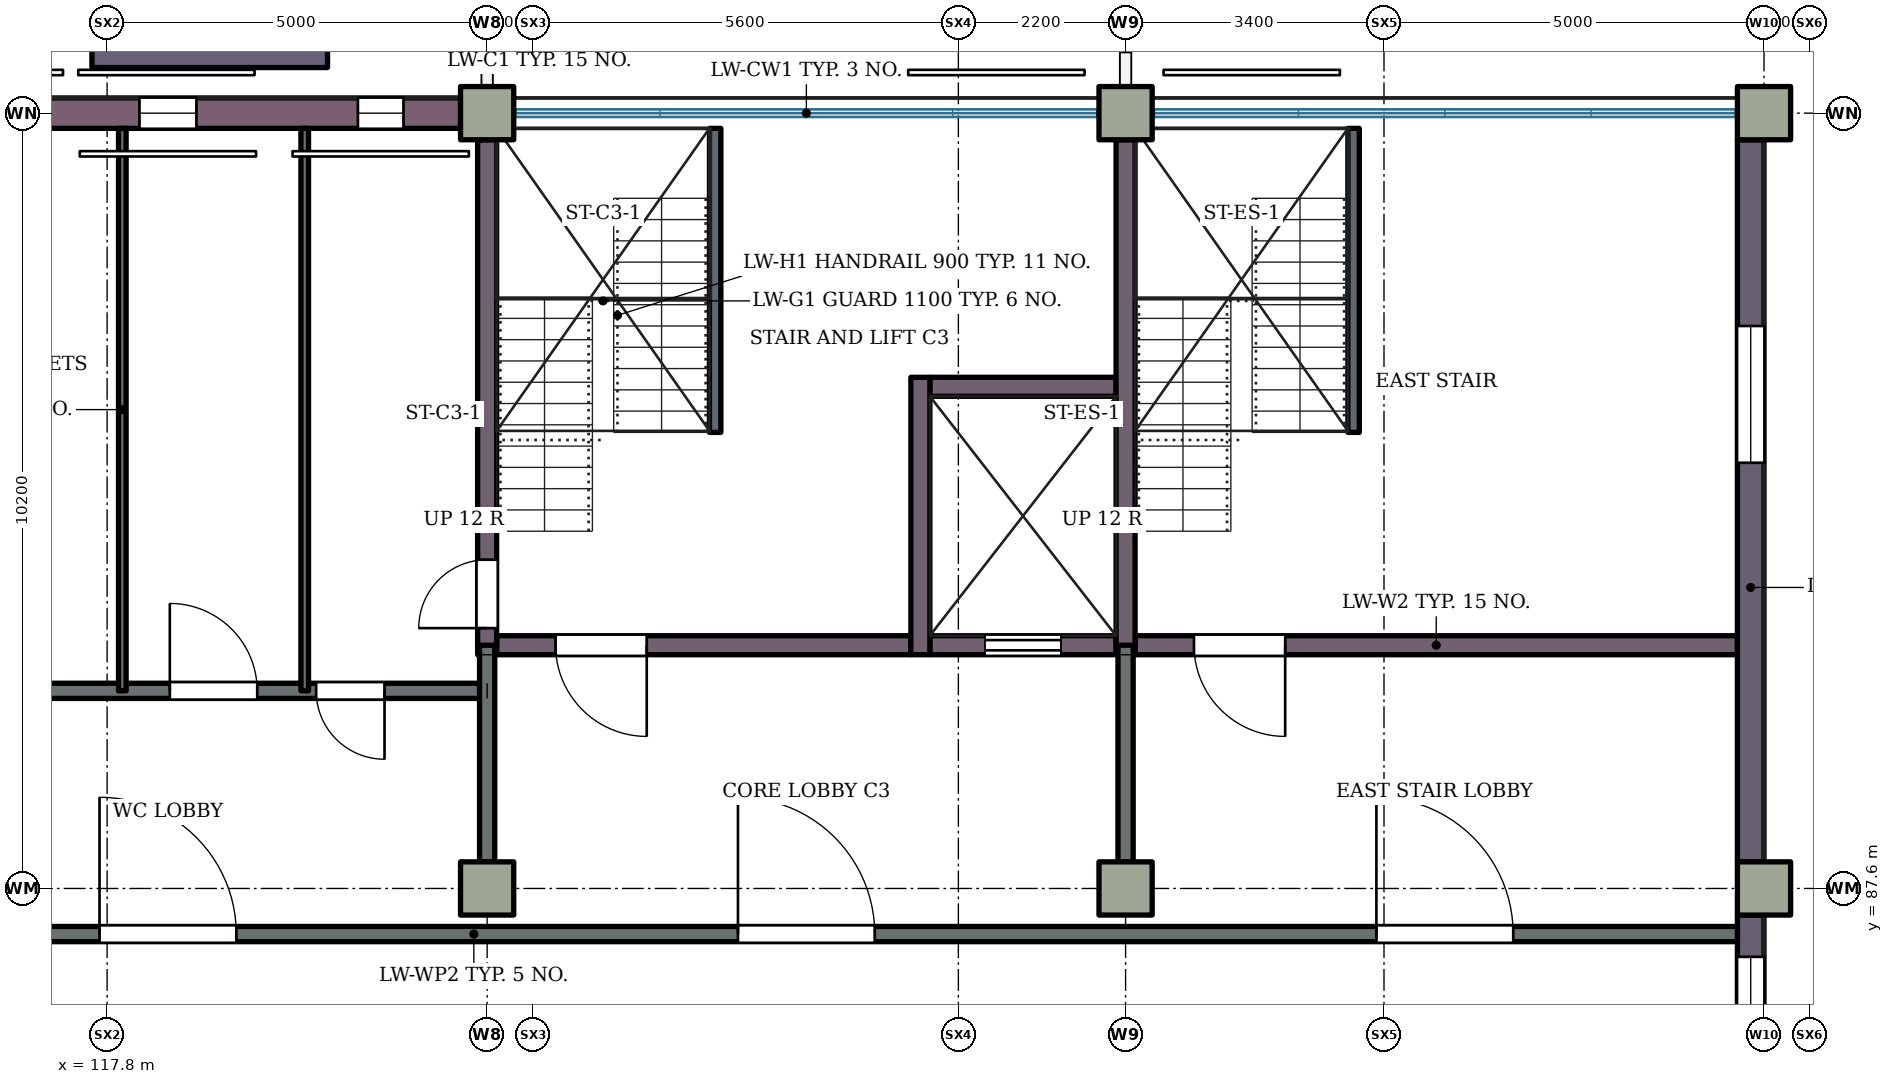
"""IFC4 building model, lengths in metres.
Left out: names, types, materials, properties, quantities, classifications, styles, units other than length and angle.
Written with IfcOpenShell. Run it as: python <this file> out.ifc"""

import sys

from ifc_helpers import new_model, si_unit, direction, frame, frame_2d, origin, origin_2d, place, context, subcontext, project, spatial, rectangle, extrude, element, fill, save


model = new_model("IFC4")
c1 = context("Model", 3, precision=1e-05, world=origin(), true_north=direction((0.0, 1.0)))
c2 = subcontext(c1, "Body", "Model", "MODEL_VIEW")
j1 = project(units=[si_unit("LENGTHUNIT", "METRE"), si_unit("PLANEANGLEUNIT", "RADIAN")], contexts=[c1])
p1 = place(None, origin())
s1 = spatial("IfcSite", under=j1, at=p1, CompositionType="ELEMENT")
p2 = place(p1, origin())
s2 = spatial("IfcBuilding", under=s1, at=p2, CompositionType="ELEMENT")
p3 = place(p2, frame((0.0, 0.0, 4.2)))
s3 = spatial("IfcBuildingStorey", under=s2, at=p3, CompositionType="ELEMENT", Elevation=4.2)
for number, where, z_axis, x_axis in (
    (1, (122.8, 87.6, 0.0), (0.0, 0.0, 1.0), (1.0, 0.0, 0.0)),
    (2, (131.2, 87.6, 0.0), (0.0, 0.0, 1.0), (1.0, 0.0, 0.0)),
    (3, (139.6, 87.6, 0.0), (0.0, 0.0, 1.0), (1.0, 0.0, 0.0)),
    (4, (122.8, 97.8, 0.0), (0.0, 0.0, 1.0), (1.0, 0.0, 0.0)),
    (5, (131.2, 97.8, 0.0), (0.0, 0.0, 1.0), (1.0, 0.0, 0.0)),
    (6, (139.6, 97.8, 0.0), (0.0, 0.0, 1.0), (1.0, 0.0, 0.0)),
):
    element("IfcColumn", number, at=place(p3, frame(where, z_axis=z_axis, x_axis=x_axis)), inside=s3, PredefinedType="COLUMN", context=c2, shape_type="SweptSolid", body=[
        extrude(rectangle(XDim=0.7, YDim=0.7, at=origin_2d()), origin(), (0.0, 0.0, 1.0), 4.2),
    ])
p4 = place(p3, frame((122.925, 90.8, 0.0), z_axis=(0.0, 0.0, 1.0), x_axis=(1.0, 0.0, 0.0)))
e7 = element("IfcWall", 7, at=p4, inside=s3, PredefinedType="SHEAR", context=c2, shape_type="SweptSolid", body=[
    extrude(rectangle(XDim=5.45, YDim=0.25, at=frame_2d((2.725, 0.0))), origin(), (0.0, 0.0, 1.0), 4.2),
])
p5 = place(p4, frame((0.775, 0.0, 0.0)))
e8 = element("IfcOpeningElement", 8, at=p5, cuts=e7, PredefinedType="OPENING", context=c2, shape_type="SweptSolid", body=[
    extrude(rectangle(XDim=1.2, YDim=2.1, at=frame_2d((0.6, 1.05))), frame((0.0, 0.135, 0.0), z_axis=(0.0, -1.0, 0.0), x_axis=(1.0, 0.0, 0.0)), (0.0, 0.0, 1.0), 0.27),
])
p6 = place(p3, frame((128.625, 90.8, 0.0), z_axis=(0.0, 0.0, 1.0), x_axis=(1.0, 0.0, 0.0)))
e9 = element("IfcWall", 9, at=p6, inside=s3, PredefinedType="SHEAR", context=c2, shape_type="SweptSolid", body=[
    extrude(rectangle(XDim=2.45, YDim=0.25, at=frame_2d((1.225, 0.0))), origin(), (0.0, 0.0, 1.0), 4.2),
])
p7 = place(p6, frame((0.725, 0.0, 0.0)))
e10 = element("IfcOpeningElement", 10, at=p7, cuts=e9, PredefinedType="OPENING", context=c2, shape_type="SweptSolid", body=[
    extrude(rectangle(XDim=1.0, YDim=2.1, at=frame_2d((0.5, 1.05))), frame((0.0, 0.135, 0.0), z_axis=(0.0, -1.0, 0.0), x_axis=(1.0, 0.0, 0.0)), (0.0, 0.0, 1.0), 0.27),
])
p8 = place(p3, frame((131.325, 90.8, 0.0), z_axis=(0.0, 0.0, 1.0), x_axis=(1.0, 0.0, 0.0)))
e11 = element("IfcWall", 11, at=p8, inside=s3, PredefinedType="SHEAR", context=c2, shape_type="SweptSolid", body=[
    extrude(rectangle(XDim=7.925, YDim=0.25, at=frame_2d((3.962, 0.0))), origin(), (0.0, 0.0, 1.0), 4.2),
])
p9 = place(p8, frame((0.775, 0.0, 0.0)))
e12 = element("IfcOpeningElement", 12, at=p9, cuts=e11, PredefinedType="OPENING", context=c2, shape_type="SweptSolid", body=[
    extrude(rectangle(XDim=1.2, YDim=2.1, at=frame_2d((0.6, 1.05))), frame((0.0, 0.135, 0.0), z_axis=(0.0, -1.0, 0.0), x_axis=(1.0, 0.0, 0.0)), (0.0, 0.0, 1.0), 0.27),
])
p10 = place(p3, frame((128.625, 94.2, 0.0), z_axis=(0.0, 0.0, 1.0), x_axis=(1.0, 0.0, 0.0)))
e13 = element("IfcWall", 13, at=p10, inside=s3, PredefinedType="SHEAR", context=c2, shape_type="SweptSolid", body=[
    extrude(rectangle(XDim=2.45, YDim=0.25, at=frame_2d((1.225, 0.0))), origin(), (0.0, 0.0, 1.0), 4.2),
])
p11 = place(p3, frame((122.8, 90.675, 0.0), z_axis=(0.0, 0.0, 1.0), x_axis=(0.0, 1.0, 0.0)))
e14 = element("IfcWall", 14, at=p11, inside=s3, PredefinedType="SHEAR", context=c2, shape_type="SweptSolid", body=[
    extrude(rectangle(XDim=6.775, YDim=0.25, at=frame_2d((3.387, 0.0))), origin(), (0.0, 0.0, 1.0), 4.2),
])
p12 = place(p11, frame((0.35, 0.0, 0.0)))
e15 = element("IfcOpeningElement", 15, at=p12, cuts=e14, PredefinedType="OPENING", context=c2, shape_type="SweptSolid", body=[
    extrude(rectangle(XDim=0.9, YDim=2.1, at=frame_2d((0.45, 1.05))), frame((0.0, 0.135, 0.0), z_axis=(0.0, -1.0, 0.0), x_axis=(1.0, 0.0, 0.0)), (0.0, 0.0, 1.0), 0.27),
])
p13 = place(p3, frame((128.5, 90.675, 0.0), z_axis=(0.0, 0.0, 1.0), x_axis=(0.0, 1.0, 0.0)))
e16 = element("IfcWall", 16, at=p13, inside=s3, PredefinedType="SHEAR", context=c2, shape_type="SweptSolid", body=[
    extrude(rectangle(XDim=3.65, YDim=0.25, at=frame_2d((1.825, 0.0))), origin(), (0.0, 0.0, 1.0), 4.2),
])
p14 = place(p3, frame((131.2, 90.675, 0.0), z_axis=(0.0, 0.0, 1.0), x_axis=(0.0, 1.0, 0.0)))
e17 = element("IfcWall", 17, at=p14, inside=s3, PredefinedType="SHEAR", context=c2, shape_type="SweptSolid", body=[
    extrude(rectangle(XDim=6.775, YDim=0.25, at=frame_2d((3.387, 0.0))), origin(), (0.0, 0.0, 1.0), 4.2),
])
p15 = place(p3, frame((139.425, 87.25, 0.0), z_axis=(0.0, 0.0, 1.0), x_axis=(0.0, -1.0, 0.0)))
e18 = element("IfcWall", 18, at=p15, inside=s3, PredefinedType="SHEAR", context=c2, shape_type="SweptSolid", body=[
    extrude(rectangle(XDim=8.5, YDim=0.35, at=frame_2d((4.25, 0.0))), origin(), (0.0, 0.0, 1.0), 4.2),
])
p16 = place(p15, frame((6.15, 0.0, 0.9)))
e19 = element("IfcOpeningElement", 19, at=p16, cuts=e18, PredefinedType="OPENING", context=c2, shape_type="SweptSolid", body=[
    extrude(rectangle(XDim=1.8, YDim=2.1, at=frame_2d((0.9, 1.05))), frame((0.0, 0.185, 0.0), z_axis=(0.0, -1.0, 0.0), x_axis=(1.0, 0.0, 0.0)), (0.0, 0.0, 1.0), 0.37),
])
p17 = place(p15, frame((0.55, 0.0, 0.9)))
e20 = element("IfcOpeningElement", 20, at=p17, cuts=e18, PredefinedType="OPENING", context=c2, shape_type="SweptSolid", body=[
    extrude(rectangle(XDim=1.8, YDim=2.1, at=frame_2d((0.9, 1.05))), frame((0.0, 0.185, 0.0), z_axis=(0.0, -1.0, 0.0), x_axis=(1.0, 0.0, 0.0)), (0.0, 0.0, 1.0), 0.37),
])
p18 = place(p3, frame((139.425, 97.45, 0.0), z_axis=(0.0, 0.0, 1.0), x_axis=(0.0, -1.0, 0.0)))
e21 = element("IfcWall", 21, at=p18, inside=s3, PredefinedType="SHEAR", context=c2, shape_type="SweptSolid", body=[
    extrude(rectangle(XDim=9.5, YDim=0.35, at=frame_2d((4.75, 0.0))), origin(), (0.0, 0.0, 1.0), 4.2),
])
p19 = place(p18, frame((2.45, 0.0, 0.9)))
e22 = element("IfcOpeningElement", 22, at=p19, cuts=e21, PredefinedType="OPENING", context=c2, shape_type="SweptSolid", body=[
    extrude(rectangle(XDim=1.8, YDim=2.1, at=frame_2d((0.9, 1.05))), frame((0.0, 0.185, 0.0), z_axis=(0.0, -1.0, 0.0), x_axis=(1.0, 0.0, 0.0)), (0.0, 0.0, 1.0), 0.37),
])
p20 = place(p3, frame((114.75, 97.8, 0.0), z_axis=(0.0, 0.0, 1.0), x_axis=(1.0, 0.0, 0.0)))
e23 = element("IfcWall", 23, at=p20, inside=s3, PredefinedType="SOLIDWALL", context=c2, shape_type="SweptSolid", body=[
    extrude(rectangle(XDim=7.7, YDim=0.4, at=frame_2d((3.85, 0.0))), origin(), (0.0, 0.0, 1.0), 3.32),
])
p21 = place(p20, frame((0.75, 0.0, 2.1)))
e24 = element("IfcOpeningElement", 24, at=p21, cuts=e23, PredefinedType="OPENING", context=c2, shape_type="SweptSolid", body=[
    extrude(rectangle(XDim=0.6, YDim=0.9, at=frame_2d((0.3, 0.45))), frame((0.0, 0.21, 0.0), z_axis=(0.0, -1.0, 0.0), x_axis=(1.0, 0.0, 0.0)), (0.0, 0.0, 1.0), 0.42),
])
p22 = place(p20, frame((3.475, 0.0, 2.1)))
e25 = element("IfcOpeningElement", 25, at=p22, cuts=e23, PredefinedType="OPENING", context=c2, shape_type="SweptSolid", body=[
    extrude(rectangle(XDim=0.75, YDim=0.9, at=frame_2d((0.375, 0.45))), frame((0.0, 0.21, 0.0), z_axis=(0.0, -1.0, 0.0), x_axis=(1.0, 0.0, 0.0)), (0.0, 0.0, 1.0), 0.42),
])
p23 = place(p20, frame((6.35, 0.0, 2.1)))
e26 = element("IfcOpeningElement", 26, at=p23, cuts=e23, PredefinedType="OPENING", context=c2, shape_type="SweptSolid", body=[
    extrude(rectangle(XDim=0.6, YDim=0.9, at=frame_2d((0.3, 0.45))), frame((0.0, 0.21, 0.0), z_axis=(0.0, -1.0, 0.0), x_axis=(1.0, 0.0, 0.0)), (0.0, 0.0, 1.0), 0.42),
])
p24 = place(p3, frame((120.7, 98.9, 0.0), z_axis=(0.0, 0.0, 1.0), x_axis=(-1.0, 0.0, 0.0)))
e27 = element("IfcWall", 27, at=p24, inside=s3, PredefinedType="STANDARD", context=c2, shape_type="SweptSolid", body=[
    extrude(rectangle(XDim=3.1, YDim=1.0, at=frame_2d((1.55, 0.0))), origin(), (0.0, 0.0, 1.0), 4.2),
])
p25 = place(p3, frame((106.0, 87.0, 0.0), z_axis=(0.0, 0.0, 1.0), x_axis=(1.0, 0.0, 0.0)))
e28 = element("IfcWall", 28, at=p25, inside=s3, PredefinedType="PARTITIONING", context=c2, shape_type="SweptSolid", body=[
    extrude(rectangle(XDim=33.25, YDim=0.2, at=frame_2d((16.625, 0.0))), origin(), (0.0, 0.0, 1.0), 3.92),
])
p26 = place(p25, frame((3.3, 0.0, 0.0)))
e29 = element("IfcOpeningElement", 29, at=p26, cuts=e28, PredefinedType="OPENING", context=c2, shape_type="SweptSolid", body=[
    extrude(rectangle(XDim=1.8, YDim=2.1, at=frame_2d((0.9, 1.05))), frame((0.0, 0.11, 0.0), z_axis=(0.0, -1.0, 0.0), x_axis=(1.0, 0.0, 0.0)), (0.0, 0.0, 1.0), 0.22),
])
p27 = place(p25, frame((11.7, 0.0, 0.0)))
e30 = element("IfcOpeningElement", 30, at=p27, cuts=e28, PredefinedType="OPENING", context=c2, shape_type="SweptSolid", body=[
    extrude(rectangle(XDim=1.8, YDim=2.1, at=frame_2d((0.9, 1.05))), frame((0.0, 0.11, 0.0), z_axis=(0.0, -1.0, 0.0), x_axis=(1.0, 0.0, 0.0)), (0.0, 0.0, 1.0), 0.22),
])
p28 = place(p25, frame((20.1, 0.0, 0.0)))
e31 = element("IfcOpeningElement", 31, at=p28, cuts=e28, PredefinedType="OPENING", context=c2, shape_type="SweptSolid", body=[
    extrude(rectangle(XDim=1.8, YDim=2.1, at=frame_2d((0.9, 1.05))), frame((0.0, 0.11, 0.0), z_axis=(0.0, -1.0, 0.0), x_axis=(1.0, 0.0, 0.0)), (0.0, 0.0, 1.0), 0.22),
])
p29 = place(p25, frame((28.5, 0.0, 0.0)))
e32 = element("IfcOpeningElement", 32, at=p29, cuts=e28, PredefinedType="OPENING", context=c2, shape_type="SweptSolid", body=[
    extrude(rectangle(XDim=1.8, YDim=2.1, at=frame_2d((0.9, 1.05))), frame((0.0, 0.11, 0.0), z_axis=(0.0, -1.0, 0.0), x_axis=(1.0, 0.0, 0.0)), (0.0, 0.0, 1.0), 0.22),
])
p30 = place(p3, frame((114.4, 90.2, 0.0), z_axis=(0.0, 0.0, 1.0), x_axis=(1.0, 0.0, 0.0)))
e33 = element("IfcWall", 33, at=p30, inside=s3, PredefinedType="PARTITIONING", context=c2, shape_type="SweptSolid", body=[
    extrude(rectangle(XDim=8.4, YDim=0.2, at=frame_2d((4.2, 0.0))), origin(), (0.0, 0.0, 1.0), 3.92),
])
p31 = place(p30, frame((1.35, 0.0, 0.0)))
e34 = element("IfcOpeningElement", 34, at=p31, cuts=e33, PredefinedType="OPENING", context=c2, shape_type="SweptSolid", body=[
    extrude(rectangle(XDim=0.9, YDim=2.1, at=frame_2d((0.45, 1.05))), frame((0.0, 0.11, 0.0), z_axis=(0.0, -1.0, 0.0), x_axis=(1.0, 0.0, 0.0)), (0.0, 0.0, 1.0), 0.22),
])
p32 = place(p30, frame((4.225, 0.0, 0.0)))
e35 = element("IfcOpeningElement", 35, at=p32, cuts=e33, PredefinedType="OPENING", context=c2, shape_type="SweptSolid", body=[
    extrude(rectangle(XDim=1.15, YDim=2.1, at=frame_2d((0.575, 1.05))), frame((0.0, 0.11, 0.0), z_axis=(0.0, -1.0, 0.0), x_axis=(1.0, 0.0, 0.0)), (0.0, 0.0, 1.0), 0.22),
])
p33 = place(p30, frame((6.15, 0.0, 0.0)))
e36 = element("IfcOpeningElement", 36, at=p33, cuts=e33, PredefinedType="OPENING", context=c2, shape_type="SweptSolid", body=[
    extrude(rectangle(XDim=0.9, YDim=2.1, at=frame_2d((0.45, 1.05))), frame((0.0, 0.11, 0.0), z_axis=(0.0, -1.0, 0.0), x_axis=(1.0, 0.0, 0.0)), (0.0, 0.0, 1.0), 0.22),
])
for number, where, z_axis, x_axis in (
    (37, (118.0, 90.2, 0.0), (0.0, 0.0, 1.0), (0.0, 1.0, 0.0)),
    (38, (120.4, 90.2, 0.0), (0.0, 0.0, 1.0), (0.0, 1.0, 0.0)),
):
    element("IfcWall", number, at=place(p3, frame(where, z_axis=z_axis, x_axis=x_axis)), inside=s3, PredefinedType="PARTITIONING", context=c2, shape_type="SweptSolid", body=[
        extrude(rectangle(XDim=7.4, YDim=0.1, at=frame_2d((3.7, 0.0))), origin(), (0.0, 0.0, 1.0), 3.92),
    ])
for number, where, z_axis, x_axis in (
    (39, (122.8, 87.95, 0.0), (0.0, 0.0, 1.0), (0.0, 1.0, 0.0)),
    (40, (131.2, 87.95, 0.0), (0.0, 0.0, 1.0), (0.0, 1.0, 0.0)),
):
    element("IfcWall", number, at=place(p3, frame(where, z_axis=z_axis, x_axis=x_axis)), inside=s3, PredefinedType="PARTITIONING", context=c2, shape_type="SweptSolid", body=[
        extrude(rectangle(XDim=2.85, YDim=0.2, at=frame_2d((1.425, 0.0))), origin(), (0.0, 0.0, 1.0), 3.02),
    ])
for number, where, z_axis, x_axis in (
    (41, (125.8, 93.6, 0.0), (0.0, 0.0, 1.0), (0.0, 1.0, 0.0)),
    (42, (134.2, 93.6, 0.0), (0.0, 0.0, 1.0), (0.0, 1.0, 0.0)),
):
    element("IfcWall", number, at=place(p3, frame(where, z_axis=z_axis, x_axis=x_axis)), inside=s3, PredefinedType="PARTITIONING", context=c2, shape_type="SweptSolid", body=[
        extrude(rectangle(XDim=4.0, YDim=0.15, at=frame_2d((2.0, 0.0))), origin(), (0.0, 0.0, 1.0), 3.92),
    ])
p34 = place(p22, origin())
e43 = element("IfcWindow", 43, at=p34, inside=s3, PartitioningType="SINGLE_PANEL", PredefinedType="WINDOW", context=c2, shape_type="SweptSolid", body=[
    extrude(rectangle(XDim=0.75, YDim=0.9, at=frame_2d((0.375, 0.45))), frame((0.0, 0.03, 0.0), z_axis=(0.0, -1.0, 0.0), x_axis=(1.0, 0.0, 0.0)), (0.0, 0.0, 1.0), 0.06),
])
fill(e25, e43)
p35 = place(p23, origin())
e44 = element("IfcWindow", 44, at=p35, inside=s3, PartitioningType="SINGLE_PANEL", PredefinedType="WINDOW", context=c2, shape_type="SweptSolid", body=[
    extrude(rectangle(XDim=0.6, YDim=0.9, at=frame_2d((0.3, 0.45))), frame((0.0, 0.03, 0.0), z_axis=(0.0, -1.0, 0.0), x_axis=(1.0, 0.0, 0.0)), (0.0, 0.0, 1.0), 0.06),
])
fill(e26, e44)
p36 = place(p17, origin())
e45 = element("IfcWindow", 45, at=p36, inside=s3, PartitioningType="SINGLE_PANEL", PredefinedType="WINDOW", context=c2, shape_type="SweptSolid", body=[
    extrude(rectangle(XDim=1.8, YDim=2.1, at=frame_2d((0.9, 1.05))), frame((0.0, 0.03, 0.0), z_axis=(0.0, -1.0, 0.0), x_axis=(1.0, 0.0, 0.0)), (0.0, 0.0, 1.0), 0.06),
])
fill(e20, e45)
p37 = place(p19, origin())
e46 = element("IfcWindow", 46, at=p37, inside=s3, PartitioningType="SINGLE_PANEL", PredefinedType="WINDOW", context=c2, shape_type="SweptSolid", body=[
    extrude(rectangle(XDim=1.8, YDim=2.1, at=frame_2d((0.9, 1.05))), frame((0.0, 0.03, 0.0), z_axis=(0.0, -1.0, 0.0), x_axis=(1.0, 0.0, 0.0)), (0.0, 0.0, 1.0), 0.06),
])
fill(e22, e46)
p38 = place(p32, origin())
e47 = element("IfcDoor", 47, at=p38, inside=s3, OperationType="SINGLE_SWING_LEFT", PredefinedType="DOOR", context=c2, shape_type="SweptSolid", body=[
    extrude(rectangle(XDim=1.15, YDim=2.1, at=frame_2d((0.575, 1.05))), frame((0.0, 0.025, 0.0), z_axis=(0.0, -1.0, 0.0), x_axis=(1.0, 0.0, 0.0)), (0.0, 0.0, 1.0), 0.05),
])
fill(e35, e47)
p39 = place(p33, origin())
e48 = element("IfcDoor", 48, at=p39, inside=s3, OperationType="SINGLE_SWING_RIGHT", PredefinedType="DOOR", context=c2, shape_type="SweptSolid", body=[
    extrude(rectangle(XDim=0.9, YDim=2.1, at=frame_2d((0.45, 1.05))), frame((0.0, 0.025, 0.0), z_axis=(0.0, -1.0, 0.0), x_axis=(1.0, 0.0, 0.0)), (0.0, 0.0, 1.0), 0.05),
])
fill(e36, e48)
p40 = place(p12, origin())
e49 = element("IfcDoor", 49, at=p40, inside=s3, OperationType="SINGLE_SWING_LEFT", PredefinedType="DOOR", context=c2, shape_type="SweptSolid", body=[
    extrude(rectangle(XDim=0.9, YDim=2.1, at=frame_2d((0.45, 1.05))), frame((0.0, 0.025, 0.0), z_axis=(0.0, -1.0, 0.0), x_axis=(1.0, 0.0, 0.0)), (0.0, 0.0, 1.0), 0.05),
])
fill(e15, e49)
p41 = place(p27, origin())
e50 = element("IfcDoor", 50, at=p41, inside=s3, OperationType="DOUBLE_DOOR_SINGLE_SWING", PredefinedType="DOOR", context=c2, shape_type="SweptSolid", body=[
    extrude(rectangle(XDim=1.8, YDim=2.1, at=frame_2d((0.9, 1.05))), frame((0.0, 0.025, 0.0), z_axis=(0.0, -1.0, 0.0), x_axis=(1.0, 0.0, 0.0)), (0.0, 0.0, 1.0), 0.05),
])
fill(e30, e50)
p42 = place(p28, origin())
e51 = element("IfcDoor", 51, at=p42, inside=s3, OperationType="DOUBLE_DOOR_SINGLE_SWING", PredefinedType="DOOR", context=c2, shape_type="SweptSolid", body=[
    extrude(rectangle(XDim=1.8, YDim=2.1, at=frame_2d((0.9, 1.05))), frame((0.0, 0.025, 0.0), z_axis=(0.0, -1.0, 0.0), x_axis=(1.0, 0.0, 0.0)), (0.0, 0.0, 1.0), 0.05),
])
fill(e31, e51)
p43 = place(p29, origin())
e52 = element("IfcDoor", 52, at=p43, inside=s3, OperationType="DOUBLE_DOOR_SINGLE_SWING", PredefinedType="DOOR", context=c2, shape_type="SweptSolid", body=[
    extrude(rectangle(XDim=1.8, YDim=2.1, at=frame_2d((0.9, 1.05))), frame((0.0, 0.025, 0.0), z_axis=(0.0, -1.0, 0.0), x_axis=(1.0, 0.0, 0.0)), (0.0, 0.0, 1.0), 0.05),
])
fill(e32, e52)
p44 = place(p5, origin())
e53 = element("IfcDoor", 53, at=p44, inside=s3, OperationType="SINGLE_SWING_RIGHT", PredefinedType="DOOR", context=c2, shape_type="SweptSolid", body=[
    extrude(rectangle(XDim=1.2, YDim=2.1, at=frame_2d((0.6, 1.05))), frame((0.0, 0.025, 0.0), z_axis=(0.0, -1.0, 0.0), x_axis=(1.0, 0.0, 0.0)), (0.0, 0.0, 1.0), 0.05),
])
fill(e8, e53)
p45 = place(p7, origin())
e54 = element("IfcDoor", 54, at=p45, inside=s3, OperationType="SLIDING_TO_LEFT", PredefinedType="DOOR", context=c2, shape_type="SweptSolid", body=[
    extrude(rectangle(XDim=1.0, YDim=2.1, at=frame_2d((0.5, 1.05))), frame((0.0, 0.025, 0.0), z_axis=(0.0, -1.0, 0.0), x_axis=(1.0, 0.0, 0.0)), (0.0, 0.0, 1.0), 0.05),
])
fill(e10, e54)
p46 = place(p9, origin())
e55 = element("IfcDoor", 55, at=p46, inside=s3, OperationType="SINGLE_SWING_RIGHT", PredefinedType="DOOR", context=c2, shape_type="SweptSolid", body=[
    extrude(rectangle(XDim=1.2, YDim=2.1, at=frame_2d((0.6, 1.05))), frame((0.0, 0.025, 0.0), z_axis=(0.0, -1.0, 0.0), x_axis=(1.0, 0.0, 0.0)), (0.0, 0.0, 1.0), 0.05),
])
fill(e12, e55)
save(model, sys.argv[1])
